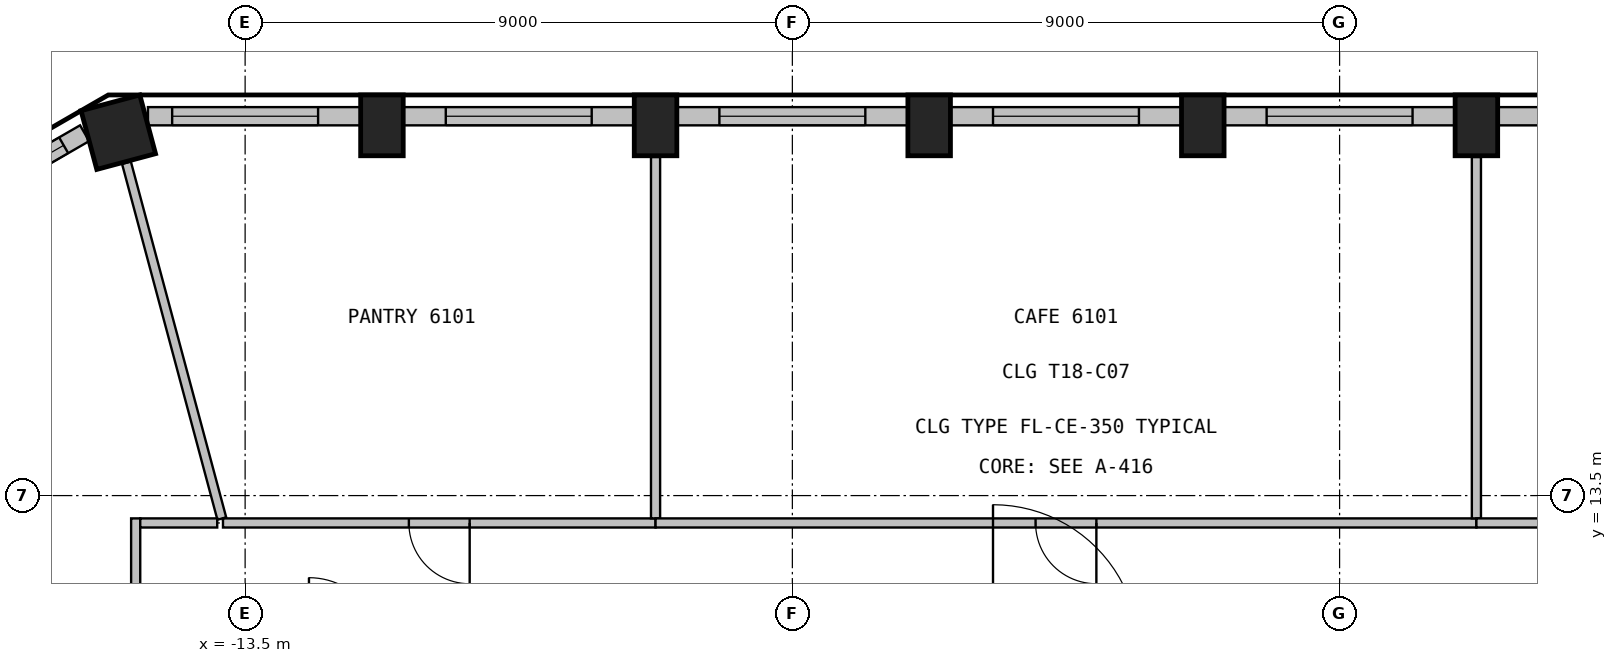
"""IFC4 building model, lengths in metres.
Left out: names, types, materials, properties, quantities, classifications, styles, units other than length and angle.
Written with IfcOpenShell. Run it as: python <this file> out.ifc"""

import sys

from ifc_helpers import new_model, si_unit, direction, frame, frame_2d, origin, origin_2d, place, context, subcontext, project, spatial, rectangle, extrude, element, fill, save


model = new_model("IFC4")
c1 = context("Model", 3, precision=1e-05, world=origin(), true_north=direction((0.0, 1.0)))
c2 = subcontext(c1, "Body", "Model", "MODEL_VIEW")
j1 = project(units=[si_unit("LENGTHUNIT", "METRE"), si_unit("PLANEANGLEUNIT", "RADIAN")], contexts=[c1])
p1 = place(None, origin())
s1 = spatial("IfcSite", under=j1, at=p1, CompositionType="ELEMENT")
p2 = place(p1, origin())
s2 = spatial("IfcBuilding", under=s1, at=p2, CompositionType="ELEMENT")
p3 = place(p2, frame((0.0, 0.0, 246.9)))
s3 = spatial("IfcBuildingStorey", under=s2, at=p3, CompositionType="ELEMENT", Elevation=246.9)
for number, where, z_axis, x_axis in (
    (1, (6.75, 19.588, 0.0), (0.0, 0.0, 1.0), (-1.0, 0.0, 0.0)),
    (2, (2.25, 19.588, 0.0), (0.0, 0.0, 1.0), (-1.0, 0.0, 0.0)),
    (3, (-2.25, 19.588, 0.0), (0.0, 0.0, 1.0), (-1.0, 0.0, 0.0)),
    (4, (-6.75, 19.588, 0.0), (0.0, 0.0, 1.0), (-1.0, 0.0, 0.0)),
    (5, (-11.25, 19.588, 0.0), (0.0, 0.0, 1.0), (-1.0, 0.0, 0.0)),
):
    element("IfcColumn", number, at=place(p3, frame(where, z_axis=z_axis, x_axis=x_axis)), inside=s3, PredefinedType="COLUMN", context=c2, shape_type="SweptSolid", body=[
        extrude(rectangle(XDim=0.7, YDim=1.0, at=origin_2d()), origin(), (0.0, 0.0, 1.0), 3.575),
    ])
p4 = place(p3, frame((-15.586, 19.476, 0.0), z_axis=(0.0, 0.0, 1.0), x_axis=(-0.965925826289, -0.258819045103, 0.0)))
e6 = element("IfcColumn", 6, at=p4, inside=s3, PredefinedType="COLUMN", context=c2, shape_type="SweptSolid", body=[
    extrude(rectangle(XDim=1.0, YDim=1.0, at=origin_2d()), origin(), (0.0, 0.0, 1.0), 3.575),
])
p5 = place(p3, frame((10.899, 19.739, 0.0), z_axis=(0.0, 0.0, 1.0), x_axis=(-1.0, 0.0, 0.0)))
e7 = element("IfcWall", 7, at=p5, inside=s3, PredefinedType="SOLIDWALL", context=c2, shape_type="SweptSolid", body=[
    extrude(rectangle(XDim=3.799, YDim=0.3, at=frame_2d((1.899, 0.0))), origin(), (0.0, 0.0, 1.0), 3.575),
])
p6 = place(p5, frame((0.699, 0.0, 0.9)))
e8 = element("IfcOpeningElement", 8, at=p6, cuts=e7, PredefinedType="OPENING", context=c2, shape_type="SweptSolid", body=[
    extrude(rectangle(XDim=2.4, YDim=2.1, at=frame_2d((1.2, 1.05))), frame((0.0, 0.16, 0.0), z_axis=(0.0, -1.0, 0.0), x_axis=(1.0, 0.0, 0.0)), (0.0, 0.0, 1.0), 0.32),
])
p7 = place(p3, frame((6.399, 19.739, 0.0), z_axis=(0.0, 0.0, 1.0), x_axis=(-1.0, 0.0, 0.0)))
e9 = element("IfcWall", 9, at=p7, inside=s3, PredefinedType="SOLIDWALL", context=c2, shape_type="SweptSolid", body=[
    extrude(rectangle(XDim=3.799, YDim=0.3, at=frame_2d((1.899, 0.0))), origin(), (0.0, 0.0, 1.0), 3.575),
])
p8 = place(p7, frame((0.699, 0.0, 0.9)))
e10 = element("IfcOpeningElement", 10, at=p8, cuts=e9, PredefinedType="OPENING", context=c2, shape_type="SweptSolid", body=[
    extrude(rectangle(XDim=2.4, YDim=2.1, at=frame_2d((1.2, 1.05))), frame((0.0, 0.16, 0.0), z_axis=(0.0, -1.0, 0.0), x_axis=(1.0, 0.0, 0.0)), (0.0, 0.0, 1.0), 0.32),
])
p9 = place(p3, frame((1.899, 19.739, 0.0), z_axis=(0.0, 0.0, 1.0), x_axis=(-1.0, 0.0, 0.0)))
e11 = element("IfcWall", 11, at=p9, inside=s3, PredefinedType="SOLIDWALL", context=c2, shape_type="SweptSolid", body=[
    extrude(rectangle(XDim=3.799, YDim=0.3, at=frame_2d((1.899, 0.0))), origin(), (0.0, 0.0, 1.0), 3.575),
])
p10 = place(p9, frame((0.699, 0.0, 0.9)))
e12 = element("IfcOpeningElement", 12, at=p10, cuts=e11, PredefinedType="OPENING", context=c2, shape_type="SweptSolid", body=[
    extrude(rectangle(XDim=2.4, YDim=2.1, at=frame_2d((1.2, 1.05))), frame((0.0, 0.16, 0.0), z_axis=(0.0, -1.0, 0.0), x_axis=(1.0, 0.0, 0.0)), (0.0, 0.0, 1.0), 0.32),
])
p11 = place(p3, frame((-2.601, 19.739, 0.0), z_axis=(0.0, 0.0, 1.0), x_axis=(-1.0, 0.0, 0.0)))
e13 = element("IfcWall", 13, at=p11, inside=s3, PredefinedType="SOLIDWALL", context=c2, shape_type="SweptSolid", body=[
    extrude(rectangle(XDim=3.799, YDim=0.3, at=frame_2d((1.899, 0.0))), origin(), (0.0, 0.0, 1.0), 3.575),
])
p12 = place(p11, frame((0.699, 0.0, 0.9)))
e14 = element("IfcOpeningElement", 14, at=p12, cuts=e13, PredefinedType="OPENING", context=c2, shape_type="SweptSolid", body=[
    extrude(rectangle(XDim=2.4, YDim=2.1, at=frame_2d((1.2, 1.05))), frame((0.0, 0.16, 0.0), z_axis=(0.0, -1.0, 0.0), x_axis=(1.0, 0.0, 0.0)), (0.0, 0.0, 1.0), 0.32),
])
p13 = place(p3, frame((-7.101, 19.739, 0.0), z_axis=(0.0, 0.0, 1.0), x_axis=(-1.0, 0.0, 0.0)))
e15 = element("IfcWall", 15, at=p13, inside=s3, PredefinedType="SOLIDWALL", context=c2, shape_type="SweptSolid", body=[
    extrude(rectangle(XDim=3.799, YDim=0.3, at=frame_2d((1.899, 0.0))), origin(), (0.0, 0.0, 1.0), 3.575),
])
p14 = place(p13, frame((0.699, 0.0, 0.9)))
e16 = element("IfcOpeningElement", 16, at=p14, cuts=e15, PredefinedType="OPENING", context=c2, shape_type="SweptSolid", body=[
    extrude(rectangle(XDim=2.4, YDim=2.1, at=frame_2d((1.2, 1.05))), frame((0.0, 0.16, 0.0), z_axis=(0.0, -1.0, 0.0), x_axis=(1.0, 0.0, 0.0)), (0.0, 0.0, 1.0), 0.32),
])
p15 = place(p3, frame((-11.601, 19.739, 0.0), z_axis=(0.0, 0.0, 1.0), x_axis=(-1.0, 0.0, 0.0)))
e17 = element("IfcWall", 17, at=p15, inside=s3, PredefinedType="SOLIDWALL", context=c2, shape_type="SweptSolid", body=[
    extrude(rectangle(XDim=3.498, YDim=0.3, at=frame_2d((1.749, 0.0))), origin(), (0.0, 0.0, 1.0), 3.575),
])
p16 = place(p15, frame((0.699, 0.0, 0.9)))
e18 = element("IfcOpeningElement", 18, at=p16, cuts=e17, PredefinedType="OPENING", context=c2, shape_type="SweptSolid", body=[
    extrude(rectangle(XDim=2.4, YDim=2.1, at=frame_2d((1.2, 1.05))), frame((0.0, 0.16, 0.0), z_axis=(0.0, -1.0, 0.0), x_axis=(1.0, 0.0, 0.0)), (0.0, 0.0, 1.0), 0.32),
])
p17 = place(p3, frame((-16.14, 19.459, 0.0), z_axis=(0.0, 0.0, 1.0), x_axis=(-0.866025316205, -0.500000151692, 0.0)))
e19 = element("IfcWall", 19, at=p17, inside=s3, PredefinedType="SOLIDWALL", context=c2, shape_type="SweptSolid", body=[
    extrude(rectangle(XDim=3.196, YDim=0.3, at=frame_2d((1.598, 0.0))), origin(), (0.0, 0.0, 1.0), 3.575),
])
p18 = place(p17, frame((0.398, 0.0, 0.9)))
e20 = element("IfcOpeningElement", 20, at=p18, cuts=e19, PredefinedType="OPENING", context=c2, shape_type="SweptSolid", body=[
    extrude(rectangle(XDim=2.4, YDim=2.1, at=frame_2d((1.2, 1.05))), frame((0.0, 0.16, 0.0), z_axis=(0.0, -1.0, 0.0), x_axis=(1.0, 0.0, 0.0)), (0.0, 0.0, 1.0), 0.32),
])
p19 = place(p3, frame((-15.452, 18.974, 0.0), z_axis=(0.0, 0.0, 1.0), x_axis=(0.258896568031, -0.965905050749, 0.0)))
e21 = element("IfcWall", 21, at=p19, inside=s3, PredefinedType="PARTITIONING", context=c2, shape_type="SweptSolid", body=[
    extrude(rectangle(XDim=6.058, YDim=0.15, at=frame_2d((3.029, 0.0))), origin(), (0.0, 0.0, 1.0), 3.575),
])
p20 = place(p3, frame((-15.3, 13.125, 0.0), z_axis=(0.0, 0.0, 1.0), x_axis=(0.0, -1.0, 0.0)))
e22 = element("IfcWall", 22, at=p20, inside=s3, PredefinedType="PARTITIONING", context=c2, shape_type="SweptSolid", body=[
    extrude(rectangle(XDim=8.059, YDim=0.15, at=frame_2d((4.03, 0.0))), origin(), (0.0, 0.0, 1.0), 3.575),
])
p21 = place(p20, frame((3.53, 0.0, 0.0)))
e23 = element("IfcOpeningElement", 23, at=p21, cuts=e22, PredefinedType="OPENING", context=c2, shape_type="SweptSolid", body=[
    extrude(rectangle(XDim=1.0, YDim=2.1, at=frame_2d((0.5, 1.05))), frame((0.0, 0.085, 0.0), z_axis=(0.0, -1.0, 0.0), x_axis=(1.0, 0.0, 0.0)), (0.0, 0.0, 1.0), 0.17),
])
p22 = place(p3, frame((-13.959, 13.05, 0.0), z_axis=(0.0, 0.0, 1.0), x_axis=(-1.0, 0.0, 0.0)))
e24 = element("IfcWall", 24, at=p22, inside=s3, PredefinedType="PARTITIONING", context=c2, shape_type="SweptSolid", body=[
    extrude(rectangle(XDim=1.266, YDim=0.15, at=frame_2d((0.633, 0.0))), origin(), (0.0, 0.0, 1.0), 3.575),
])
p23 = place(p3, frame((-6.75, 13.05, 0.0), z_axis=(0.0, 0.0, 1.0), x_axis=(-1.0, 0.0, 0.0)))
e25 = element("IfcWall", 25, at=p23, inside=s3, PredefinedType="PARTITIONING", context=c2, shape_type="SweptSolid", body=[
    extrude(rectangle(XDim=7.114, YDim=0.15, at=frame_2d((3.557, 0.0))), origin(), (0.0, 0.0, 1.0), 3.575),
])
p24 = place(p23, frame((3.057, 0.0, 0.0)))
e26 = element("IfcOpeningElement", 26, at=p24, cuts=e25, PredefinedType="OPENING", context=c2, shape_type="SweptSolid", body=[
    extrude(rectangle(XDim=1.0, YDim=2.1, at=frame_2d((0.5, 1.05))), frame((0.0, 0.085, 0.0), z_axis=(0.0, -1.0, 0.0), x_axis=(1.0, 0.0, 0.0)), (0.0, 0.0, 1.0), 0.17),
])
p25 = place(p3, frame((-6.75, 19.069, 0.0), z_axis=(0.0, 0.0, 1.0), x_axis=(0.0, -1.0, 0.0)))
e27 = element("IfcWall", 27, at=p25, inside=s3, PredefinedType="PARTITIONING", context=c2, shape_type="SweptSolid", body=[
    extrude(rectangle(XDim=5.944, YDim=0.15, at=frame_2d((2.972, 0.0))), origin(), (0.0, 0.0, 1.0), 3.575),
])
p26 = place(p3, frame((6.75, 13.05, 0.0), z_axis=(0.0, 0.0, 1.0), x_axis=(-1.0, 0.0, 0.0)))
e28 = element("IfcWall", 28, at=p26, inside=s3, PredefinedType="PARTITIONING", context=c2, shape_type="SweptSolid", body=[
    extrude(rectangle(XDim=13.5, YDim=0.15, at=frame_2d((6.75, 0.0))), origin(), (0.0, 0.0, 1.0), 3.575),
])
p27 = place(p26, frame((6.25, 0.0, 0.0)))
e29 = element("IfcOpeningElement", 29, at=p27, cuts=e28, PredefinedType="OPENING", context=c2, shape_type="SweptSolid", body=[
    extrude(rectangle(XDim=1.0, YDim=2.1, at=frame_2d((0.5, 1.05))), frame((0.0, 0.085, 0.0), z_axis=(0.0, -1.0, 0.0), x_axis=(1.0, 0.0, 0.0)), (0.0, 0.0, 1.0), 0.17),
])
p28 = place(p3, frame((6.75, 19.069, 0.0), z_axis=(0.0, 0.0, 1.0), x_axis=(0.0, -1.0, 0.0)))
e30 = element("IfcWall", 30, at=p28, inside=s3, PredefinedType="PARTITIONING", context=c2, shape_type="SweptSolid", body=[
    extrude(rectangle(XDim=5.944, YDim=0.15, at=frame_2d((2.972, 0.0))), origin(), (0.0, 0.0, 1.0), 3.575),
])
p29 = place(p3, frame((15.375, 13.05, 0.0), z_axis=(0.0, 0.0, 1.0), x_axis=(-1.0, 0.0, 0.0)))
e31 = element("IfcWall", 31, at=p29, inside=s3, PredefinedType="PARTITIONING", context=c2, shape_type="SweptSolid", body=[
    extrude(rectangle(XDim=8.625, YDim=0.15, at=frame_2d((4.312, 0.0))), origin(), (0.0, 0.0, 1.0), 3.575),
])
p30 = place(p29, frame((3.812, 0.0, 0.0)))
e32 = element("IfcOpeningElement", 32, at=p30, cuts=e31, PredefinedType="OPENING", context=c2, shape_type="SweptSolid", body=[
    extrude(rectangle(XDim=1.0, YDim=2.1, at=frame_2d((0.5, 1.05))), frame((0.0, 0.085, 0.0), z_axis=(0.0, -1.0, 0.0), x_axis=(1.0, 0.0, 0.0)), (0.0, 0.0, 1.0), 0.17),
])
p31 = place(p8, origin())
e33 = element("IfcWindow", 33, at=p31, inside=s3, PartitioningType="SINGLE_PANEL", PredefinedType="WINDOW", context=c2, shape_type="SweptSolid", body=[
    extrude(rectangle(XDim=2.4, YDim=2.1, at=frame_2d((1.2, 1.05))), frame((0.0, 0.03, 0.0), z_axis=(0.0, -1.0, 0.0), x_axis=(1.0, 0.0, 0.0)), (0.0, 0.0, 1.0), 0.06),
])
fill(e10, e33)
p32 = place(p10, origin())
e34 = element("IfcWindow", 34, at=p32, inside=s3, PartitioningType="SINGLE_PANEL", PredefinedType="WINDOW", context=c2, shape_type="SweptSolid", body=[
    extrude(rectangle(XDim=2.4, YDim=2.1, at=frame_2d((1.2, 1.05))), frame((0.0, 0.03, 0.0), z_axis=(0.0, -1.0, 0.0), x_axis=(1.0, 0.0, 0.0)), (0.0, 0.0, 1.0), 0.06),
])
fill(e12, e34)
p33 = place(p12, origin())
e35 = element("IfcWindow", 35, at=p33, inside=s3, PartitioningType="SINGLE_PANEL", PredefinedType="WINDOW", context=c2, shape_type="SweptSolid", body=[
    extrude(rectangle(XDim=2.4, YDim=2.1, at=frame_2d((1.2, 1.05))), frame((0.0, 0.03, 0.0), z_axis=(0.0, -1.0, 0.0), x_axis=(1.0, 0.0, 0.0)), (0.0, 0.0, 1.0), 0.06),
])
fill(e14, e35)
p34 = place(p14, origin())
e36 = element("IfcWindow", 36, at=p34, inside=s3, PartitioningType="SINGLE_PANEL", PredefinedType="WINDOW", context=c2, shape_type="SweptSolid", body=[
    extrude(rectangle(XDim=2.4, YDim=2.1, at=frame_2d((1.2, 1.05))), frame((0.0, 0.03, 0.0), z_axis=(0.0, -1.0, 0.0), x_axis=(1.0, 0.0, 0.0)), (0.0, 0.0, 1.0), 0.06),
])
fill(e16, e36)
p35 = place(p16, origin())
e37 = element("IfcWindow", 37, at=p35, inside=s3, PartitioningType="SINGLE_PANEL", PredefinedType="WINDOW", context=c2, shape_type="SweptSolid", body=[
    extrude(rectangle(XDim=2.4, YDim=2.1, at=frame_2d((1.2, 1.05))), frame((0.0, 0.03, 0.0), z_axis=(0.0, -1.0, 0.0), x_axis=(1.0, 0.0, 0.0)), (0.0, 0.0, 1.0), 0.06),
])
fill(e18, e37)
p36 = place(p18, origin())
e38 = element("IfcWindow", 38, at=p36, inside=s3, PartitioningType="SINGLE_PANEL", PredefinedType="WINDOW", context=c2, shape_type="SweptSolid", body=[
    extrude(rectangle(XDim=2.4, YDim=2.1, at=frame_2d((1.2, 1.05))), frame((0.0, 0.03, 0.0), z_axis=(0.0, -1.0, 0.0), x_axis=(1.0, 0.0, 0.0)), (0.0, 0.0, 1.0), 0.06),
])
fill(e20, e38)
p37 = place(p24, origin())
e39 = element("IfcDoor", 39, at=p37, inside=s3, OperationType="SINGLE_SWING_RIGHT", PredefinedType="DOOR", context=c2, shape_type="SweptSolid", body=[
    extrude(rectangle(XDim=1.0, YDim=2.1, at=frame_2d((0.5, 1.05))), frame((0.0, 0.025, 0.0), z_axis=(0.0, -1.0, 0.0), x_axis=(1.0, 0.0, 0.0)), (0.0, 0.0, 1.0), 0.05),
])
fill(e26, e39)
p38 = place(p27, origin())
e40 = element("IfcDoor", 40, at=p38, inside=s3, OperationType="SINGLE_SWING_LEFT", PredefinedType="DOOR", context=c2, shape_type="SweptSolid", body=[
    extrude(rectangle(XDim=1.0, YDim=2.1, at=frame_2d((0.5, 1.05))), frame((0.0, 0.025, 0.0), z_axis=(0.0, -1.0, 0.0), x_axis=(1.0, 0.0, 0.0)), (0.0, 0.0, 1.0), 0.05),
])
fill(e29, e40)
save(model, sys.argv[1])
